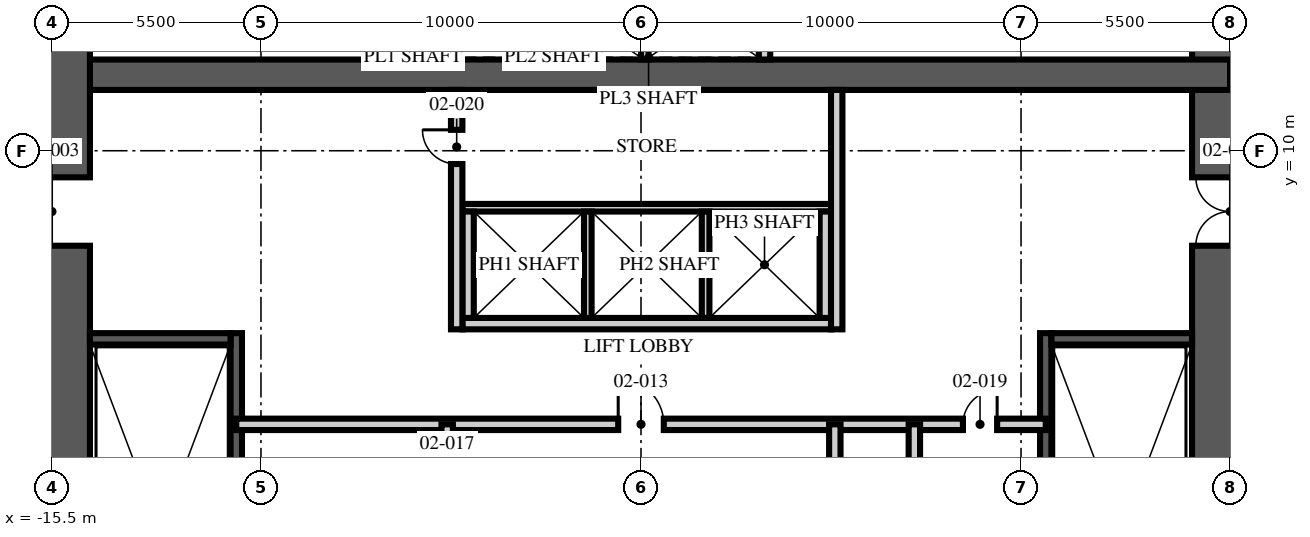
"""IFC4 building model, lengths in metres.
Left out: names, types, materials, properties, quantities, classifications, styles, units other than length and angle.
Written with IfcOpenShell. Run it as: python <this file> out.ifc"""

import sys

from ifc_helpers import new_model, si_unit, direction, frame, frame_2d, origin, place, context, subcontext, project, spatial, rectangle, extrude, element, fill, save


model = new_model("IFC4")
c1 = context("Model", 3, precision=1e-05, world=origin(), true_north=direction((0.0, 1.0)))
c2 = subcontext(c1, "Body", "Model", "MODEL_VIEW")
j1 = project(units=[si_unit("LENGTHUNIT", "METRE"), si_unit("PLANEANGLEUNIT", "RADIAN")], contexts=[c1])
p1 = place(None, origin())
s1 = spatial("IfcSite", under=j1, at=p1, CompositionType="ELEMENT")
p2 = place(p1, origin())
s2 = spatial("IfcBuilding", under=s1, at=p2, CompositionType="ELEMENT")
p3 = place(p2, frame((0.0, 0.0, 11.0)))
s3 = spatial("IfcBuildingStorey", under=s2, at=p3, CompositionType="ELEMENT", Elevation=11.0)
p4 = place(p3, frame((15.5, -15.5, -0.3), z_axis=(0.0, 0.0, 1.0), x_axis=(0.0, 1.0, 0.0)))
e1 = element("IfcWall", 1, at=p4, inside=s3, PredefinedType="SHEAR", context=c2, shape_type="SweptSolid", body=[
    extrude(rectangle(XDim=31.0, YDim=2.0, at=frame_2d((15.5, 0.0))), origin(), (0.0, 0.0, 1.0), 5.0),
])
p5 = place(p4, frame((6.5, 0.0, 0.3)))
e2 = element("IfcOpeningElement", 2, at=p5, cuts=e1, PredefinedType="OPENING", context=c2, shape_type="SweptSolid", body=[
    extrude(rectangle(XDim=1.2, YDim=2.1, at=frame_2d((0.6, 1.05))), frame((0.0, 1.01, 0.0), z_axis=(0.0, -1.0, 0.0), x_axis=(1.0, 0.0, 0.0)), (0.0, 0.0, 1.0), 2.02),
])
p6 = place(p4, frame((23.0, 0.0, 0.3)))
e3 = element("IfcOpeningElement", 3, at=p6, cuts=e1, PredefinedType="OPENING", context=c2, shape_type="SweptSolid", body=[
    extrude(rectangle(XDim=1.8, YDim=2.1, at=frame_2d((0.9, 1.05))), frame((0.0, 1.01, 0.0), z_axis=(0.0, -1.0, 0.0), x_axis=(1.0, 0.0, 0.0)), (0.0, 0.0, 1.0), 2.02),
])
p7 = place(p3, frame((-15.5, 12.0, -0.3), z_axis=(0.0, 0.0, 1.0), x_axis=(1.0, 0.0, 0.0)))
e4 = element("IfcWall", 4, at=p7, inside=s3, PredefinedType="SHEAR", context=c2, shape_type="SweptSolid", body=[
    extrude(rectangle(XDim=31.0, YDim=0.8, at=frame_2d((15.5, 0.0))), origin(), (0.0, 0.0, 1.0), 5.0),
])
p8 = place(p3, frame((-15.5, -15.5, -0.3), z_axis=(0.0, 0.0, 1.0), x_axis=(0.0, 1.0, 0.0)))
e5 = element("IfcWall", 5, at=p8, inside=s3, PredefinedType="SHEAR", context=c2, shape_type="SweptSolid", body=[
    extrude(rectangle(XDim=31.0, YDim=2.0, at=frame_2d((15.5, 0.0))), origin(), (0.0, 0.0, 1.0), 5.0),
])
p9 = place(p8, frame((6.5, 0.0, 0.3)))
e6 = element("IfcOpeningElement", 6, at=p9, cuts=e5, PredefinedType="OPENING", context=c2, shape_type="SweptSolid", body=[
    extrude(rectangle(XDim=1.2, YDim=2.1, at=frame_2d((0.6, 1.05))), frame((0.0, 1.01, 0.0), z_axis=(0.0, -1.0, 0.0), x_axis=(1.0, 0.0, 0.0)), (0.0, 0.0, 1.0), 2.02),
])
p10 = place(p8, frame((23.0, 0.0, 0.3)))
e7 = element("IfcOpeningElement", 7, at=p10, cuts=e5, PredefinedType="OPENING", context=c2, shape_type="SweptSolid", body=[
    extrude(rectangle(XDim=1.8, YDim=2.1, at=frame_2d((0.9, 1.05))), frame((0.0, 1.01, 0.0), z_axis=(0.0, -1.0, 0.0), x_axis=(1.0, 0.0, 0.0)), (0.0, 0.0, 1.0), 2.02),
])
p11 = place(p3, frame((-10.65, -4.9, 0.0), z_axis=(0.0, 0.0, 1.0), x_axis=(0.0, 1.0, 0.0)))
e8 = element("IfcWall", 8, at=p11, inside=s3, PredefinedType="SOLIDWALL", context=c2, shape_type="SweptSolid", body=[
    extrude(rectangle(XDim=10.1, YDim=0.3, at=frame_2d((5.05, 0.0))), origin(), (0.0, 0.0, 1.0), 4.7),
])
p12 = place(p3, frame((-14.5, 5.05, 0.0), z_axis=(0.0, 0.0, 1.0), x_axis=(1.0, 0.0, 0.0)))
e9 = element("IfcWall", 9, at=p12, inside=s3, PredefinedType="SOLIDWALL", context=c2, shape_type="SweptSolid", body=[
    extrude(rectangle(XDim=3.7, YDim=0.3, at=frame_2d((1.85, 0.0))), origin(), (0.0, 0.0, 1.0), 4.7),
])
p13 = place(p3, frame((10.65, -4.9, 0.0), z_axis=(0.0, 0.0, 1.0), x_axis=(0.0, 1.0, 0.0)))
e10 = element("IfcWall", 10, at=p13, inside=s3, PredefinedType="SOLIDWALL", context=c2, shape_type="SweptSolid", body=[
    extrude(rectangle(XDim=10.1, YDim=0.3, at=frame_2d((5.05, 0.0))), origin(), (0.0, 0.0, 1.0), 4.7),
])
p14 = place(p3, frame((14.5, 5.05, 0.0), z_axis=(0.0, 0.0, 1.0), x_axis=(-1.0, 0.0, 0.0)))
e11 = element("IfcWall", 11, at=p14, inside=s3, PredefinedType="SOLIDWALL", context=c2, shape_type="SweptSolid", body=[
    extrude(rectangle(XDim=3.7, YDim=0.3, at=frame_2d((1.85, 0.0))), origin(), (0.0, 0.0, 1.0), 4.7),
])
p15 = place(p3, frame((-4.7, 5.45, 0.0), z_axis=(0.0, 0.0, 1.0), x_axis=(1.0, 0.0, 0.0)))
e12 = element("IfcWall", 12, at=p15, inside=s3, PredefinedType="PARTITIONING", context=c2, shape_type="SweptSolid", body=[
    extrude(rectangle(XDim=9.7, YDim=0.3, at=frame_2d((4.85, 0.0))), origin(), (0.0, 0.0, 1.0), 4.7),
])
p16 = place(p3, frame((-4.7, 8.5, 0.0), z_axis=(0.0, 0.0, 1.0), x_axis=(1.0, 0.0, 0.0)))
e13 = element("IfcWall", 13, at=p16, inside=s3, PredefinedType="PARTITIONING", context=c2, shape_type="SweptSolid", body=[
    extrude(rectangle(XDim=9.7, YDim=0.2, at=frame_2d((4.85, 0.0))), origin(), (0.0, 0.0, 1.0), 4.7),
])
for number, where, z_axis, x_axis in (
    (14, (-4.55, 5.6, 0.0), (0.0, 0.0, 1.0), (0.0, 1.0, 0.0)),
    (15, (4.85, 5.6, 0.0), (0.0, 0.0, 1.0), (0.0, 1.0, 0.0)),
):
    element("IfcWall", number, at=place(p3, frame(where, z_axis=z_axis, x_axis=x_axis)), inside=s3, PredefinedType="PARTITIONING", context=c2, shape_type="SweptSolid", body=[
        extrude(rectangle(XDim=2.8, YDim=0.3, at=frame_2d((1.4, 0.0))), origin(), (0.0, 0.0, 1.0), 4.7),
    ])
for number, where, z_axis, x_axis in (
    (16, (-1.4, 5.6, 0.0), (0.0, 0.0, 1.0), (0.0, 1.0, 0.0)),
    (17, (1.7, 5.6, 0.0), (0.0, 0.0, 1.0), (0.0, 1.0, 0.0)),
):
    element("IfcWall", number, at=place(p3, frame(where, z_axis=z_axis, x_axis=x_axis)), inside=s3, PredefinedType="PARTITIONING", context=c2, shape_type="SweptSolid", body=[
        extrude(rectangle(XDim=2.8, YDim=0.2, at=frame_2d((1.4, 0.0))), origin(), (0.0, 0.0, 1.0), 4.7),
    ])
for number, where, z_axis, x_axis in (
    (18, (-6.15, 12.4, 0.0), (0.0, 0.0, 1.0), (0.0, 1.0, 0.0)),
    (19, (3.25, 12.4, 0.0), (0.0, 0.0, 1.0), (0.0, 1.0, 0.0)),
):
    element("IfcWall", number, at=place(p3, frame(where, z_axis=z_axis, x_axis=x_axis)), inside=s3, PredefinedType="PARTITIONING", context=c2, shape_type="SweptSolid", body=[
        extrude(rectangle(XDim=2.1, YDim=0.3, at=frame_2d((1.05, 0.0))), origin(), (0.0, 0.0, 1.0), 4.7),
    ])
for number, where, z_axis, x_axis in (
    (20, (-3.0, 12.4, 0.0), (0.0, 0.0, 1.0), (0.0, 1.0, 0.0)),
    (21, (0.1, 12.4, 0.0), (0.0, 0.0, 1.0), (0.0, 1.0, 0.0)),
):
    element("IfcWall", number, at=place(p3, frame(where, z_axis=z_axis, x_axis=x_axis)), inside=s3, PredefinedType="PARTITIONING", context=c2, shape_type="SweptSolid", body=[
        extrude(rectangle(XDim=2.1, YDim=0.2, at=frame_2d((1.05, 0.0))), origin(), (0.0, 0.0, 1.0), 4.7),
    ])
p17 = place(p3, frame((-10.65, 2.8, 0.0), z_axis=(0.0, 0.0, 1.0), x_axis=(1.0, 0.0, 0.0)))
e22 = element("IfcWall", 22, at=p17, inside=s3, PredefinedType="PARTITIONING", context=c2, shape_type="SweptSolid", body=[
    extrude(rectangle(XDim=21.3, YDim=0.3, at=frame_2d((10.65, 0.0))), origin(), (0.0, 0.0, 1.0), 4.7),
])
p18 = place(p17, frame((10.05, 0.0, 0.0)))
e23 = element("IfcOpeningElement", 23, at=p18, cuts=e22, PredefinedType="OPENING", context=c2, shape_type="SweptSolid", body=[
    extrude(rectangle(XDim=1.2, YDim=2.1, at=frame_2d((0.6, 1.05))), frame((0.0, 0.16, 0.0), z_axis=(0.0, -1.0, 0.0), x_axis=(1.0, 0.0, 0.0)), (0.0, 0.0, 1.0), 0.32),
])
p19 = place(p17, frame((19.121, 0.0, 0.0)))
e24 = element("IfcOpeningElement", 24, at=p19, cuts=e22, PredefinedType="OPENING", context=c2, shape_type="SweptSolid", body=[
    extrude(rectangle(XDim=0.9, YDim=2.1, at=frame_2d((0.45, 1.05))), frame((0.0, 0.16, 0.0), z_axis=(0.0, -1.0, 0.0), x_axis=(1.0, 0.0, 0.0)), (0.0, 0.0, 1.0), 0.32),
])
p20 = place(p3, frame((-5.1, -6.65, 0.0), z_axis=(0.0, 0.0, 1.0), x_axis=(0.0, 1.0, 0.0)))
e25 = element("IfcWall", 25, at=p20, inside=s3, PredefinedType="PARTITIONING", context=c2, shape_type="SweptSolid", body=[
    extrude(rectangle(XDim=9.45, YDim=0.3, at=frame_2d((4.725, 0.0))), origin(), (0.0, 0.0, 1.0), 4.7),
])
p21 = place(p20, frame((2.648, 0.0, 0.0)))
e26 = element("IfcOpeningElement", 26, at=p21, cuts=e25, PredefinedType="OPENING", context=c2, shape_type="SweptSolid", body=[
    extrude(rectangle(XDim=0.9, YDim=2.1, at=frame_2d((0.45, 1.05))), frame((0.0, 0.16, 0.0), z_axis=(0.0, -1.0, 0.0), x_axis=(1.0, 0.0, 0.0)), (0.0, 0.0, 1.0), 0.32),
])
p22 = place(p20, frame((7.373, 0.0, 0.0)))
e27 = element("IfcOpeningElement", 27, at=p22, cuts=e25, PredefinedType="OPENING", context=c2, shape_type="SweptSolid", body=[
    extrude(rectangle(XDim=0.9, YDim=2.1, at=frame_2d((0.45, 1.05))), frame((0.0, 0.16, 0.0), z_axis=(0.0, -1.0, 0.0), x_axis=(1.0, 0.0, 0.0)), (0.0, 0.0, 1.0), 0.32),
])
p23 = place(p3, frame((5.1, -6.65, 0.0), z_axis=(0.0, 0.0, 1.0), x_axis=(0.0, 1.0, 0.0)))
e28 = element("IfcWall", 28, at=p23, inside=s3, PredefinedType="PARTITIONING", context=c2, shape_type="SweptSolid", body=[
    extrude(rectangle(XDim=9.45, YDim=0.3, at=frame_2d((4.725, 0.0))), origin(), (0.0, 0.0, 1.0), 4.7),
])
p24 = place(p23, frame((4.275, 0.0, 0.0)))
e29 = element("IfcOpeningElement", 29, at=p24, cuts=e28, PredefinedType="OPENING", context=c2, shape_type="SweptSolid", body=[
    extrude(rectangle(XDim=0.9, YDim=2.1, at=frame_2d((0.45, 1.05))), frame((0.0, 0.16, 0.0), z_axis=(0.0, -1.0, 0.0), x_axis=(1.0, 0.0, 0.0)), (0.0, 0.0, 1.0), 0.32),
])
p25 = place(p3, frame((7.193, -6.65, 0.0), z_axis=(0.0, 0.0, 1.0), x_axis=(0.0, 1.0, 0.0)))
e30 = element("IfcWall", 30, at=p25, inside=s3, PredefinedType="PARTITIONING", context=c2, shape_type="SweptSolid", body=[
    extrude(rectangle(XDim=9.45, YDim=0.3, at=frame_2d((4.725, 0.0))), origin(), (0.0, 0.0, 1.0), 4.7),
])
p26 = place(p3, frame((-4.85, 5.3, 0.0), z_axis=(0.0, 0.0, 1.0), x_axis=(0.0, 1.0, 0.0)))
e31 = element("IfcWall", 31, at=p26, inside=s3, PredefinedType="PARTITIONING", context=c2, shape_type="SweptSolid", body=[
    extrude(rectangle(XDim=6.3, YDim=0.3, at=frame_2d((3.15, 0.0))), origin(), (0.0, 0.0, 1.0), 4.7),
])
p27 = place(p26, frame((4.35, 0.0, 0.0)))
e32 = element("IfcOpeningElement", 32, at=p27, cuts=e31, PredefinedType="OPENING", context=c2, shape_type="SweptSolid", body=[
    extrude(rectangle(XDim=0.9, YDim=2.1, at=frame_2d((0.45, 1.05))), frame((0.0, 0.16, 0.0), z_axis=(0.0, -1.0, 0.0), x_axis=(1.0, 0.0, 0.0)), (0.0, 0.0, 1.0), 0.32),
])
p28 = place(p3, frame((5.15, 5.3, 0.0), z_axis=(0.0, 0.0, 1.0), x_axis=(0.0, 1.0, 0.0)))
e33 = element("IfcWall", 33, at=p28, inside=s3, PredefinedType="PARTITIONING", context=c2, shape_type="SweptSolid", body=[
    extrude(rectangle(XDim=6.3, YDim=0.3, at=frame_2d((3.15, 0.0))), origin(), (0.0, 0.0, 1.0), 4.7),
])
p29 = place(p10, origin())
e34 = element("IfcDoor", 34, at=p29, inside=s3, OperationType="DOUBLE_DOOR_SINGLE_SWING", PredefinedType="DOOR", context=c2, shape_type="SweptSolid", body=[
    extrude(rectangle(XDim=1.8, YDim=2.1, at=frame_2d((0.9, 1.05))), frame((0.0, 0.025, 0.0), z_axis=(0.0, -1.0, 0.0), x_axis=(1.0, 0.0, 0.0)), (0.0, 0.0, 1.0), 0.05),
])
fill(e7, e34)
p30 = place(p6, origin())
e35 = element("IfcDoor", 35, at=p30, inside=s3, OperationType="DOUBLE_DOOR_SINGLE_SWING", PredefinedType="DOOR", context=c2, shape_type="SweptSolid", body=[
    extrude(rectangle(XDim=1.8, YDim=2.1, at=frame_2d((0.9, 1.05))), frame((0.0, 0.025, 0.0), z_axis=(0.0, -1.0, 0.0), x_axis=(1.0, 0.0, 0.0)), (0.0, 0.0, 1.0), 0.05),
])
fill(e3, e35)
p31 = place(p18, origin())
e36 = element("IfcDoor", 36, at=p31, inside=s3, OperationType="SINGLE_SWING_LEFT", PredefinedType="DOOR", context=c2, shape_type="SweptSolid", body=[
    extrude(rectangle(XDim=1.2, YDim=2.1, at=frame_2d((0.6, 1.05))), frame((0.0, 0.025, 0.0), z_axis=(0.0, -1.0, 0.0), x_axis=(1.0, 0.0, 0.0)), (0.0, 0.0, 1.0), 0.05),
])
fill(e23, e36)
p32 = place(p19, origin())
e37 = element("IfcDoor", 37, at=p32, inside=s3, OperationType="SINGLE_SWING_RIGHT", PredefinedType="DOOR", context=c2, shape_type="SweptSolid", body=[
    extrude(rectangle(XDim=0.9, YDim=2.1, at=frame_2d((0.45, 1.05))), frame((0.0, 0.025, 0.0), z_axis=(0.0, -1.0, 0.0), x_axis=(1.0, 0.0, 0.0)), (0.0, 0.0, 1.0), 0.05),
])
fill(e24, e37)
p33 = place(p27, origin())
e38 = element("IfcDoor", 38, at=p33, inside=s3, OperationType="SINGLE_SWING_RIGHT", PredefinedType="DOOR", context=c2, shape_type="SweptSolid", body=[
    extrude(rectangle(XDim=0.9, YDim=2.1, at=frame_2d((0.45, 1.05))), frame((0.0, 0.025, 0.0), z_axis=(0.0, -1.0, 0.0), x_axis=(1.0, 0.0, 0.0)), (0.0, 0.0, 1.0), 0.05),
])
fill(e32, e38)
save(model, sys.argv[1])
